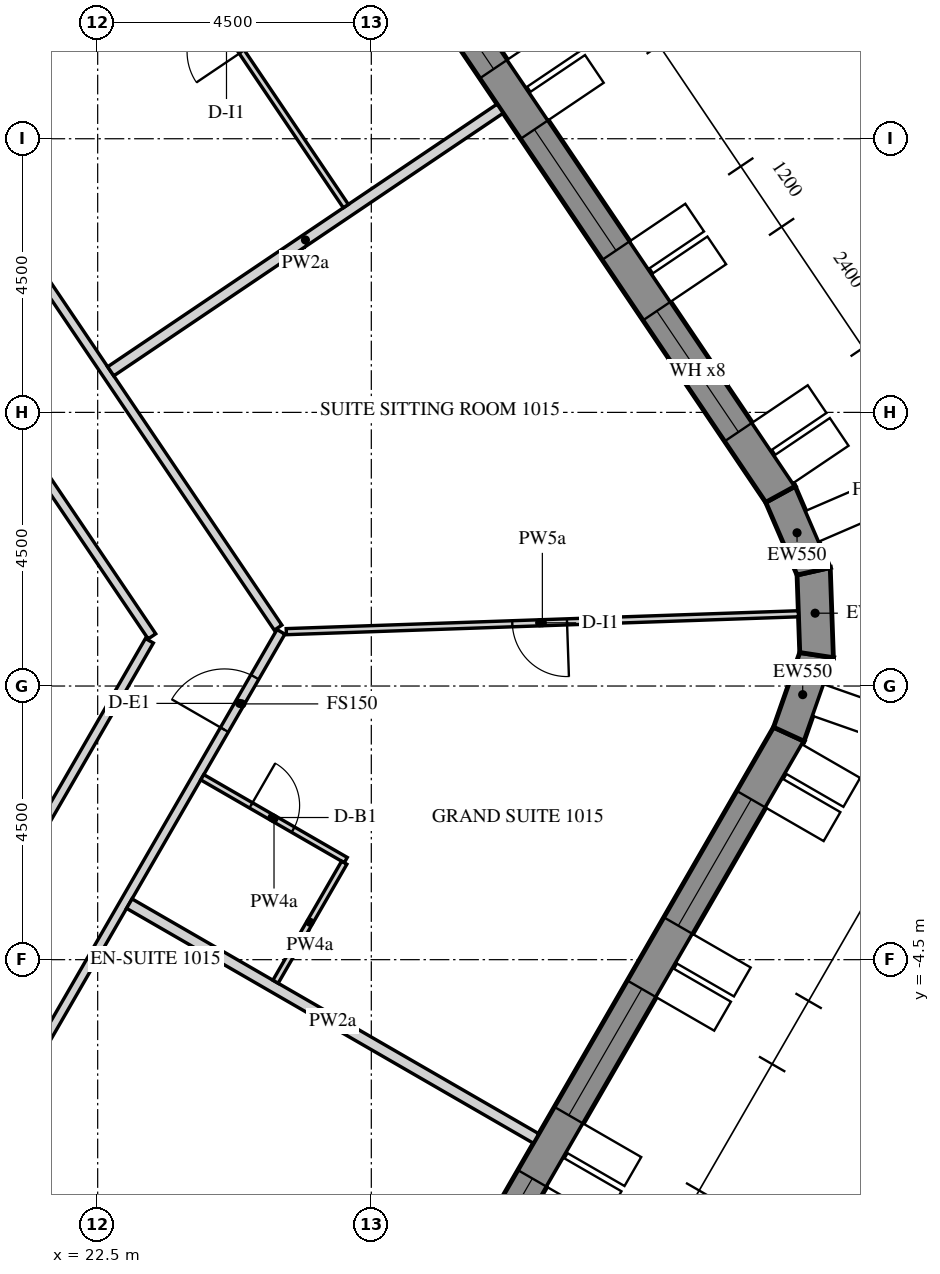
"""IFC4 building model, lengths in metres.
Left out: names, types, materials, properties, quantities, classifications, styles, units other than length and angle.
Written with IfcOpenShell. Run it as: python <this file> out.ifc"""

import sys

from ifc_helpers import new_model, si_unit, direction, frame, frame_2d, origin, place, context, subcontext, project, spatial, polyline, rectangle, outline, extrude, element, fill, save


model = new_model("IFC4")
c1 = context("Model", 3, precision=1e-05, world=origin(), true_north=direction((0.0, 1.0)))
c2 = subcontext(c1, "Body", "Model", "MODEL_VIEW")
j1 = project(units=[si_unit("LENGTHUNIT", "METRE"), si_unit("PLANEANGLEUNIT", "RADIAN")], contexts=[c1])
p1 = place(None, origin())
s1 = spatial("IfcSite", under=j1, at=p1, CompositionType="ELEMENT")
p2 = place(p1, origin())
s2 = spatial("IfcBuilding", under=s1, at=p2, CompositionType="ELEMENT")
p3 = place(p2, frame((0.0, 0.0, 135.0)))
s3 = spatial("IfcBuildingStorey", under=s2, at=p3, CompositionType="ELEMENT", Elevation=135.0)
p4 = place(p3, frame((18.83, -26.835, -0.15), z_axis=(0.0, 0.0, 1.0), x_axis=(0.500003800416, 0.866023209602, 0.0)))
e1 = element("IfcWall", 1, at=p4, inside=s3, PredefinedType="SOLIDWALL", context=c2, shape_type="SweptSolid", body=[
    extrude(outline(polyline([(-0.022, -0.275), (30.097, -0.275), (30.045, 0.275), (0.022, 0.275), (-0.022, -0.275)])), origin(), (0.0, 0.0, 1.0), 3.9),
])
p5 = place(p4, frame((1.236, 0.0, 1.05)))
e2 = element("IfcOpeningElement", 2, at=p5, cuts=e1, PredefinedType="OPENING", context=c2, shape_type="SweptSolid", body=[
    extrude(rectangle(XDim=2.4, YDim=2.4, at=frame_2d((1.2, 1.2))), frame((0.0, 0.285, 0.0), z_axis=(0.0, -1.0, 0.0), x_axis=(1.0, 0.0, 0.0)), (0.0, 0.0, 1.0), 0.57),
])
p6 = place(p4, frame((4.835, 0.0, 1.05)))
e3 = element("IfcOpeningElement", 3, at=p6, cuts=e1, PredefinedType="OPENING", context=c2, shape_type="SweptSolid", body=[
    extrude(rectangle(XDim=2.4, YDim=2.4, at=frame_2d((1.2, 1.2))), frame((0.0, 0.285, 0.0), z_axis=(0.0, -1.0, 0.0), x_axis=(1.0, 0.0, 0.0)), (0.0, 0.0, 1.0), 0.57),
])
p7 = place(p4, frame((8.436, 0.0, 1.05)))
e4 = element("IfcOpeningElement", 4, at=p7, cuts=e1, PredefinedType="OPENING", context=c2, shape_type="SweptSolid", body=[
    extrude(rectangle(XDim=2.4, YDim=2.4, at=frame_2d((1.2, 1.2))), frame((0.0, 0.285, 0.0), z_axis=(0.0, -1.0, 0.0), x_axis=(1.0, 0.0, 0.0)), (0.0, 0.0, 1.0), 0.57),
])
p8 = place(p4, frame((12.035, 0.0, 1.05)))
e5 = element("IfcOpeningElement", 5, at=p8, cuts=e1, PredefinedType="OPENING", context=c2, shape_type="SweptSolid", body=[
    extrude(rectangle(XDim=2.4, YDim=2.4, at=frame_2d((1.2, 1.2))), frame((0.0, 0.285, 0.0), z_axis=(0.0, -1.0, 0.0), x_axis=(1.0, 0.0, 0.0)), (0.0, 0.0, 1.0), 0.57),
])
p9 = place(p4, frame((15.635, 0.0, 1.05)))
e6 = element("IfcOpeningElement", 6, at=p9, cuts=e1, PredefinedType="OPENING", context=c2, shape_type="SweptSolid", body=[
    extrude(rectangle(XDim=2.4, YDim=2.4, at=frame_2d((1.2, 1.2))), frame((0.0, 0.285, 0.0), z_axis=(0.0, -1.0, 0.0), x_axis=(1.0, 0.0, 0.0)), (0.0, 0.0, 1.0), 0.57),
])
p10 = place(p4, frame((19.236, 0.0, 1.05)))
e7 = element("IfcOpeningElement", 7, at=p10, cuts=e1, PredefinedType="OPENING", context=c2, shape_type="SweptSolid", body=[
    extrude(rectangle(XDim=2.4, YDim=2.4, at=frame_2d((1.2, 1.2))), frame((0.0, 0.285, 0.0), z_axis=(0.0, -1.0, 0.0), x_axis=(1.0, 0.0, 0.0)), (0.0, 0.0, 1.0), 0.57),
])
p11 = place(p4, frame((22.835, 0.0, 1.05)))
e8 = element("IfcOpeningElement", 8, at=p11, cuts=e1, PredefinedType="OPENING", context=c2, shape_type="SweptSolid", body=[
    extrude(rectangle(XDim=2.4, YDim=2.4, at=frame_2d((1.2, 1.2))), frame((0.0, 0.285, 0.0), z_axis=(0.0, -1.0, 0.0), x_axis=(1.0, 0.0, 0.0)), (0.0, 0.0, 1.0), 0.57),
])
p12 = place(p4, frame((26.436, 0.0, 1.05)))
e9 = element("IfcOpeningElement", 9, at=p12, cuts=e1, PredefinedType="OPENING", context=c2, shape_type="SweptSolid", body=[
    extrude(rectangle(XDim=2.4, YDim=2.4, at=frame_2d((1.2, 1.2))), frame((0.0, 0.285, 0.0), z_axis=(0.0, -1.0, 0.0), x_axis=(1.0, 0.0, 0.0)), (0.0, 0.0, 1.0), 0.57),
])
p13 = place(p3, frame((33.866, -0.792, -0.15), z_axis=(0.0, 0.0, 1.0), x_axis=(0.33111537203, 0.943590276765, 0.0)))
e10 = element("IfcWall", 10, at=p13, inside=s3, PredefinedType="SOLIDWALL", context=c2, shape_type="SweptSolid", body=[
    extrude(outline(polyline([(-0.026, -0.275), (1.431, -0.275), (1.327, 0.275), (0.026, 0.275), (-0.026, -0.275)])), origin(), (0.0, 0.0, 1.0), 3.9),
])
p14 = place(p3, frame((34.323, 0.509, -0.15), z_axis=(0.0, 0.0, 1.0), x_axis=(-0.034876908462, 0.999391615562, 0.0)))
e11 = element("IfcWall", 11, at=p14, inside=s3, PredefinedType="SOLIDWALL", context=c2, shape_type="SweptSolid", body=[
    extrude(outline(polyline([(-0.052, -0.275), (1.431, -0.275), (1.327, 0.275), (0.052, 0.275), (-0.052, -0.275)])), origin(), (0.0, 0.0, 1.0), 3.9),
])
p15 = place(p3, frame((34.274, 1.887, -0.15), z_axis=(0.0, 0.0, 1.0), x_axis=(-0.396161342798, 0.918180913803, 0.0)))
e12 = element("IfcWall", 12, at=p15, inside=s3, PredefinedType="SOLIDWALL", context=c2, shape_type="SweptSolid", body=[
    extrude(outline(polyline([(-0.052, -0.275), (1.405, -0.275), (1.354, 0.275), (0.052, 0.275), (-0.052, -0.275)])), origin(), (0.0, 0.0, 1.0), 3.9),
])
p16 = place(p3, frame((33.728, 3.153, -0.15), z_axis=(0.0, 0.0, 1.0), x_axis=(-0.559192411416, 0.82903790445, 0.0)))
e13 = element("IfcWall", 13, at=p16, inside=s3, PredefinedType="SOLIDWALL", context=c2, shape_type="SweptSolid", body=[
    extrude(outline(polyline([(-0.026, -0.275), (30.093, -0.275), (30.048, 0.275), (0.026, 0.275), (-0.026, -0.275)])), origin(), (0.0, 0.0, 1.0), 3.9),
])
p17 = place(p16, frame((1.236, 0.0, 1.05)))
e14 = element("IfcOpeningElement", 14, at=p17, cuts=e13, PredefinedType="OPENING", context=c2, shape_type="SweptSolid", body=[
    extrude(rectangle(XDim=2.4, YDim=2.4, at=frame_2d((1.2, 1.2))), frame((0.0, 0.285, 0.0), z_axis=(0.0, -1.0, 0.0), x_axis=(1.0, 0.0, 0.0)), (0.0, 0.0, 1.0), 0.57),
])
p18 = place(p16, frame((4.835, 0.0, 1.05)))
e15 = element("IfcOpeningElement", 15, at=p18, cuts=e13, PredefinedType="OPENING", context=c2, shape_type="SweptSolid", body=[
    extrude(rectangle(XDim=2.4, YDim=2.4, at=frame_2d((1.2, 1.2))), frame((0.0, 0.285, 0.0), z_axis=(0.0, -1.0, 0.0), x_axis=(1.0, 0.0, 0.0)), (0.0, 0.0, 1.0), 0.57),
])
p19 = place(p16, frame((8.436, 0.0, 1.05)))
e16 = element("IfcOpeningElement", 16, at=p19, cuts=e13, PredefinedType="OPENING", context=c2, shape_type="SweptSolid", body=[
    extrude(rectangle(XDim=2.4, YDim=2.4, at=frame_2d((1.2, 1.2))), frame((0.0, 0.285, 0.0), z_axis=(0.0, -1.0, 0.0), x_axis=(1.0, 0.0, 0.0)), (0.0, 0.0, 1.0), 0.57),
])
p20 = place(p16, frame((12.035, 0.0, 1.05)))
e17 = element("IfcOpeningElement", 17, at=p20, cuts=e13, PredefinedType="OPENING", context=c2, shape_type="SweptSolid", body=[
    extrude(rectangle(XDim=2.4, YDim=2.4, at=frame_2d((1.2, 1.2))), frame((0.0, 0.285, 0.0), z_axis=(0.0, -1.0, 0.0), x_axis=(1.0, 0.0, 0.0)), (0.0, 0.0, 1.0), 0.57),
])
p21 = place(p16, frame((15.635, 0.0, 1.05)))
e18 = element("IfcOpeningElement", 18, at=p21, cuts=e13, PredefinedType="OPENING", context=c2, shape_type="SweptSolid", body=[
    extrude(rectangle(XDim=2.4, YDim=2.4, at=frame_2d((1.2, 1.2))), frame((0.0, 0.285, 0.0), z_axis=(0.0, -1.0, 0.0), x_axis=(1.0, 0.0, 0.0)), (0.0, 0.0, 1.0), 0.57),
])
p22 = place(p16, frame((19.236, 0.0, 1.05)))
e19 = element("IfcOpeningElement", 19, at=p22, cuts=e13, PredefinedType="OPENING", context=c2, shape_type="SweptSolid", body=[
    extrude(rectangle(XDim=2.4, YDim=2.4, at=frame_2d((1.2, 1.2))), frame((0.0, 0.285, 0.0), z_axis=(0.0, -1.0, 0.0), x_axis=(1.0, 0.0, 0.0)), (0.0, 0.0, 1.0), 0.57),
])
p23 = place(p16, frame((22.835, 0.0, 1.05)))
e20 = element("IfcOpeningElement", 20, at=p23, cuts=e13, PredefinedType="OPENING", context=c2, shape_type="SweptSolid", body=[
    extrude(rectangle(XDim=2.4, YDim=2.4, at=frame_2d((1.2, 1.2))), frame((0.0, 0.285, 0.0), z_axis=(0.0, -1.0, 0.0), x_axis=(1.0, 0.0, 0.0)), (0.0, 0.0, 1.0), 0.57),
])
p24 = place(p16, frame((26.436, 0.0, 1.05)))
e21 = element("IfcOpeningElement", 21, at=p24, cuts=e13, PredefinedType="OPENING", context=c2, shape_type="SweptSolid", body=[
    extrude(rectangle(XDim=2.4, YDim=2.4, at=frame_2d((1.2, 1.2))), frame((0.0, 0.285, 0.0), z_axis=(0.0, -1.0, 0.0), x_axis=(1.0, 0.0, 0.0)), (0.0, 0.0, 1.0), 0.57),
])
p25 = place(p3, frame((13.755, -19.475, 0.0), z_axis=(0.0, 0.0, 1.0), x_axis=(0.50000013933, 0.866025323342, 0.0)))
e22 = element("IfcWall", 22, at=p25, inside=s3, PredefinedType="PARTITIONING", context=c2, shape_type="SweptSolid", body=[
    extrude(rectangle(XDim=23.517, YDim=0.15, at=frame_2d((11.758, 0.0))), origin(), (0.0, 0.0, 1.0), 2.838),
])
p26 = place(p25, frame((4.456, 0.0, 0.0)))
e23 = element("IfcOpeningElement", 23, at=p26, cuts=e22, PredefinedType="OPENING", context=c2, shape_type="SweptSolid", body=[
    extrude(rectangle(XDim=1.0, YDim=2.1, at=frame_2d((0.5, 1.05))), frame((0.0, 0.085, 0.0), z_axis=(0.0, -1.0, 0.0), x_axis=(1.0, 0.0, 0.0)), (0.0, 0.0, 1.0), 0.17),
])
p27 = place(p25, frame((13.699, 0.0, 0.0)))
e24 = element("IfcOpeningElement", 24, at=p27, cuts=e22, PredefinedType="OPENING", context=c2, shape_type="SweptSolid", body=[
    extrude(rectangle(XDim=1.0, YDim=2.1, at=frame_2d((0.5, 1.05))), frame((0.0, 0.085, 0.0), z_axis=(0.0, -1.0, 0.0), x_axis=(1.0, 0.0, 0.0)), (0.0, 0.0, 1.0), 0.17),
])
p28 = place(p25, frame((21.658, 0.0, 0.0)))
e25 = element("IfcOpeningElement", 25, at=p28, cuts=e22, PredefinedType="OPENING", context=c2, shape_type="SweptSolid", body=[
    extrude(rectangle(XDim=1.0, YDim=2.1, at=frame_2d((0.5, 1.05))), frame((0.0, 0.085, 0.0), z_axis=(0.0, -1.0, 0.0), x_axis=(1.0, 0.0, 0.0)), (0.0, 0.0, 1.0), 0.17),
])
p29 = place(p3, frame((25.467, 0.96, 0.0), z_axis=(0.0, 0.0, 1.0), x_axis=(-0.559200743185, 0.829032284547, 0.0)))
e26 = element("IfcWall", 26, at=p29, inside=s3, PredefinedType="PARTITIONING", context=c2, shape_type="SweptSolid", body=[
    extrude(rectangle(XDim=21.668, YDim=0.15, at=frame_2d((10.834, 0.0))), origin(), (0.0, 0.0, 1.0), 2.838),
])
p30 = place(p29, frame((10.434, 0.0, 0.0)))
e27 = element("IfcOpeningElement", 27, at=p30, cuts=e26, PredefinedType="OPENING", context=c2, shape_type="SweptSolid", body=[
    extrude(rectangle(XDim=1.0, YDim=2.1, at=frame_2d((0.5, 1.05))), frame((0.0, 0.085, 0.0), z_axis=(0.0, -1.0, 0.0), x_axis=(1.0, 0.0, 0.0)), (0.0, 0.0, 1.0), 0.17),
])
p31 = place(p3, frame((17.879, 8.99, 0.0), z_axis=(0.0, 0.0, 1.0), x_axis=(0.559189565351, -0.829039824136, 0.0)))
e28 = element("IfcWall", 28, at=p31, inside=s3, PredefinedType="PARTITIONING", context=c2, shape_type="SweptSolid", body=[
    extrude(rectangle(XDim=9.859, YDim=0.15, at=frame_2d((4.929, 0.0))), origin(), (0.0, 0.0, 1.0), 2.838),
])
p32 = place(p3, frame((23.351, 0.745, 0.0), z_axis=(0.0, 0.0, 1.0), x_axis=(-0.500009458068, -0.866019943097, 0.0)))
e29 = element("IfcWall", 29, at=p32, inside=s3, PredefinedType="PARTITIONING", context=c2, shape_type="SweptSolid", body=[
    extrude(rectangle(XDim=11.241, YDim=0.15, at=frame_2d((5.621, 0.0))), origin(), (0.0, 0.0, 1.0), 2.838),
])
p33 = place(p32, frame((5.171, 0.0, 0.0)))
e30 = element("IfcOpeningElement", 30, at=p33, cuts=e29, PredefinedType="OPENING", context=c2, shape_type="SweptSolid", body=[
    extrude(rectangle(XDim=0.9, YDim=2.1, at=frame_2d((0.45, 1.05))), frame((0.0, 0.085, 0.0), z_axis=(0.0, -1.0, 0.0), x_axis=(1.0, 0.0, 0.0)), (0.0, 0.0, 1.0), 0.17),
])
p34 = place(p3, frame((29.71, -7.441, 0.0), z_axis=(0.0, 0.0, 1.0), x_axis=(-0.866019273868, 0.500010617176, 0.0)))
e31 = element("IfcWall", 31, at=p34, inside=s3, PredefinedType="PARTITIONING", context=c2, shape_type="SweptSolid", body=[
    extrude(rectangle(XDim=7.725, YDim=0.18, at=frame_2d((3.862, 0.0))), origin(), (0.0, 0.0, 1.0), 2.838),
])
p35 = place(p3, frame((24.22, -1.5, 0.0), z_axis=(0.0, 0.0, 1.0), x_axis=(0.866012511928, -0.500022328685, 0.0)))
e32 = element("IfcWall", 32, at=p35, inside=s3, PredefinedType="PARTITIONING", context=c2, shape_type="SweptSolid", body=[
    extrude(rectangle(XDim=2.725, YDim=0.1, at=frame_2d((1.363, 0.0))), origin(), (0.0, 0.0, 1.0), 2.838),
])
p36 = place(p35, frame((0.925, 0.0, 0.0)))
e33 = element("IfcOpeningElement", 33, at=p36, cuts=e32, PredefinedType="OPENING", context=c2, shape_type="SweptSolid", body=[
    extrude(rectangle(XDim=0.8, YDim=2.1, at=frame_2d((0.4, 1.05))), frame((0.0, 0.06, 0.0), z_axis=(0.0, -1.0, 0.0), x_axis=(1.0, 0.0, 0.0)), (0.0, 0.0, 1.0), 0.12),
])
p37 = place(p3, frame((26.555, -2.906, 0.0), z_axis=(0.0, 0.0, 1.0), x_axis=(-0.500077800282, -0.865980481111, 0.0)))
e34 = element("IfcWall", 34, at=p37, inside=s3, PredefinedType="PARTITIONING", context=c2, shape_type="SweptSolid", body=[
    extrude(rectangle(XDim=2.26, YDim=0.1, at=frame_2d((1.13, 0.0))), origin(), (0.0, 0.0, 1.0), 2.838),
])
p38 = place(p3, frame((34.023, 1.188, 0.0), z_axis=(0.0, 0.0, 1.0), x_axis=(-0.999390379298, -0.03491231539, 0.0)))
e35 = element("IfcWall", 35, at=p38, inside=s3, PredefinedType="PARTITIONING", context=c2, shape_type="SweptSolid", body=[
    extrude(rectangle(XDim=8.427, YDim=0.1, at=frame_2d((4.213, 0.0))), origin(), (0.0, 0.0, 1.0), 2.838),
])
p39 = place(p38, frame((3.808, 0.0, 0.0)))
e36 = element("IfcOpeningElement", 36, at=p39, cuts=e35, PredefinedType="OPENING", context=c2, shape_type="SweptSolid", body=[
    extrude(rectangle(XDim=0.9, YDim=2.1, at=frame_2d((0.45, 1.05))), frame((0.0, 0.06, 0.0), z_axis=(0.0, -1.0, 0.0), x_axis=(1.0, 0.0, 0.0)), (0.0, 0.0, 1.0), 0.12),
])
p40 = place(p3, frame((29.119, 9.495, 0.0), z_axis=(0.0, 0.0, 1.0), x_axis=(-0.82903328576, -0.559199258853, 0.0)))
e37 = element("IfcWall", 37, at=p40, inside=s3, PredefinedType="PARTITIONING", context=c2, shape_type="SweptSolid", body=[
    extrude(rectangle(XDim=7.725, YDim=0.18, at=frame_2d((3.863, 0.0))), origin(), (0.0, 0.0, 1.0), 2.838),
])
p41 = place(p3, frame((26.581, 7.892, 0.0), z_axis=(0.0, 0.0, 1.0), x_axis=(-0.559185029686, 0.829042883435, 0.0)))
e38 = element("IfcWall", 38, at=p41, inside=s3, PredefinedType="PARTITIONING", context=c2, shape_type="SweptSolid", body=[
    extrude(rectangle(XDim=7.11, YDim=0.1, at=frame_2d((3.555, 0.0))), origin(), (0.0, 0.0, 1.0), 2.838),
])
p42 = place(p41, frame((3.06, 0.0, 0.0)))
e39 = element("IfcOpeningElement", 39, at=p42, cuts=e38, PredefinedType="OPENING", context=c2, shape_type="SweptSolid", body=[
    extrude(rectangle(XDim=0.9, YDim=2.1, at=frame_2d((0.45, 1.05))), frame((0.0, 0.06, 0.0), z_axis=(0.0, -1.0, 0.0), x_axis=(1.0, 0.0, 0.0)), (0.0, 0.0, 1.0), 0.12),
])
p43 = place(p10, frame((0.0, 0.205, 0.0)))
e40 = element("IfcWindow", 40, at=p43, inside=s3, PartitioningType="DOUBLE_PANEL_VERTICAL", PredefinedType="WINDOW", context=c2, shape_type="SweptSolid", body=[
    extrude(rectangle(XDim=2.4, YDim=2.4, at=frame_2d((1.2, 1.2))), frame((0.0, 0.03, 0.0), z_axis=(0.0, -1.0, 0.0), x_axis=(1.0, 0.0, 0.0)), (0.0, 0.0, 1.0), 0.06),
])
fill(e7, e40)
p44 = place(p11, frame((0.0, 0.205, 0.0)))
e41 = element("IfcWindow", 41, at=p44, inside=s3, PartitioningType="DOUBLE_PANEL_VERTICAL", PredefinedType="WINDOW", context=c2, shape_type="SweptSolid", body=[
    extrude(rectangle(XDim=2.4, YDim=2.4, at=frame_2d((1.2, 1.2))), frame((0.0, 0.03, 0.0), z_axis=(0.0, -1.0, 0.0), x_axis=(1.0, 0.0, 0.0)), (0.0, 0.0, 1.0), 0.06),
])
fill(e8, e41)
p45 = place(p12, frame((0.0, 0.205, 0.0)))
e42 = element("IfcWindow", 42, at=p45, inside=s3, PartitioningType="DOUBLE_PANEL_VERTICAL", PredefinedType="WINDOW", context=c2, shape_type="SweptSolid", body=[
    extrude(rectangle(XDim=2.4, YDim=2.4, at=frame_2d((1.2, 1.2))), frame((0.0, 0.03, 0.0), z_axis=(0.0, -1.0, 0.0), x_axis=(1.0, 0.0, 0.0)), (0.0, 0.0, 1.0), 0.06),
])
fill(e9, e42)
p46 = place(p17, frame((0.0, 0.205, 0.0)))
e43 = element("IfcWindow", 43, at=p46, inside=s3, PartitioningType="DOUBLE_PANEL_VERTICAL", PredefinedType="WINDOW", context=c2, shape_type="SweptSolid", body=[
    extrude(rectangle(XDim=2.4, YDim=2.4, at=frame_2d((1.2, 1.2))), frame((0.0, 0.03, 0.0), z_axis=(0.0, -1.0, 0.0), x_axis=(1.0, 0.0, 0.0)), (0.0, 0.0, 1.0), 0.06),
])
fill(e14, e43)
p47 = place(p18, frame((0.0, 0.205, 0.0)))
e44 = element("IfcWindow", 44, at=p47, inside=s3, PartitioningType="DOUBLE_PANEL_VERTICAL", PredefinedType="WINDOW", context=c2, shape_type="SweptSolid", body=[
    extrude(rectangle(XDim=2.4, YDim=2.4, at=frame_2d((1.2, 1.2))), frame((0.0, 0.03, 0.0), z_axis=(0.0, -1.0, 0.0), x_axis=(1.0, 0.0, 0.0)), (0.0, 0.0, 1.0), 0.06),
])
fill(e15, e44)
p48 = place(p19, frame((0.0, 0.205, 0.0)))
e45 = element("IfcWindow", 45, at=p48, inside=s3, PartitioningType="DOUBLE_PANEL_VERTICAL", PredefinedType="WINDOW", context=c2, shape_type="SweptSolid", body=[
    extrude(rectangle(XDim=2.4, YDim=2.4, at=frame_2d((1.2, 1.2))), frame((0.0, 0.03, 0.0), z_axis=(0.0, -1.0, 0.0), x_axis=(1.0, 0.0, 0.0)), (0.0, 0.0, 1.0), 0.06),
])
fill(e16, e45)
p49 = place(p28, origin())
e46 = element("IfcDoor", 46, at=p49, inside=s3, OperationType="SINGLE_SWING_RIGHT", PredefinedType="DOOR", context=c2, shape_type="SweptSolid", body=[
    extrude(rectangle(XDim=1.0, YDim=2.1, at=frame_2d((0.5, 1.05))), frame((0.0, 0.025, 0.0), z_axis=(0.0, -1.0, 0.0), x_axis=(1.0, 0.0, 0.0)), (0.0, 0.0, 1.0), 0.05),
])
fill(e25, e46)
p50 = place(p36, origin())
e47 = element("IfcDoor", 47, at=p50, inside=s3, OperationType="SINGLE_SWING_RIGHT", PredefinedType="DOOR", context=c2, shape_type="SweptSolid", body=[
    extrude(rectangle(XDim=0.8, YDim=2.1, at=frame_2d((0.4, 1.05))), frame((0.0, 0.025, 0.0), z_axis=(0.0, -1.0, 0.0), x_axis=(1.0, 0.0, 0.0)), (0.0, 0.0, 1.0), 0.05),
])
fill(e33, e47)
p51 = place(p39, origin())
e48 = element("IfcDoor", 48, at=p51, inside=s3, OperationType="SINGLE_SWING_LEFT", PredefinedType="DOOR", context=c2, shape_type="SweptSolid", body=[
    extrude(rectangle(XDim=0.9, YDim=2.1, at=frame_2d((0.45, 1.05))), frame((0.0, 0.025, 0.0), z_axis=(0.0, -1.0, 0.0), x_axis=(1.0, 0.0, 0.0)), (0.0, 0.0, 1.0), 0.05),
])
fill(e36, e48)
p52 = place(p42, origin())
e49 = element("IfcDoor", 49, at=p52, inside=s3, OperationType="SINGLE_SWING_RIGHT", PredefinedType="DOOR", context=c2, shape_type="SweptSolid", body=[
    extrude(rectangle(XDim=0.9, YDim=2.1, at=frame_2d((0.45, 1.05))), frame((0.0, 0.025, 0.0), z_axis=(0.0, -1.0, 0.0), x_axis=(1.0, 0.0, 0.0)), (0.0, 0.0, 1.0), 0.05),
])
fill(e39, e49)
save(model, sys.argv[1])
